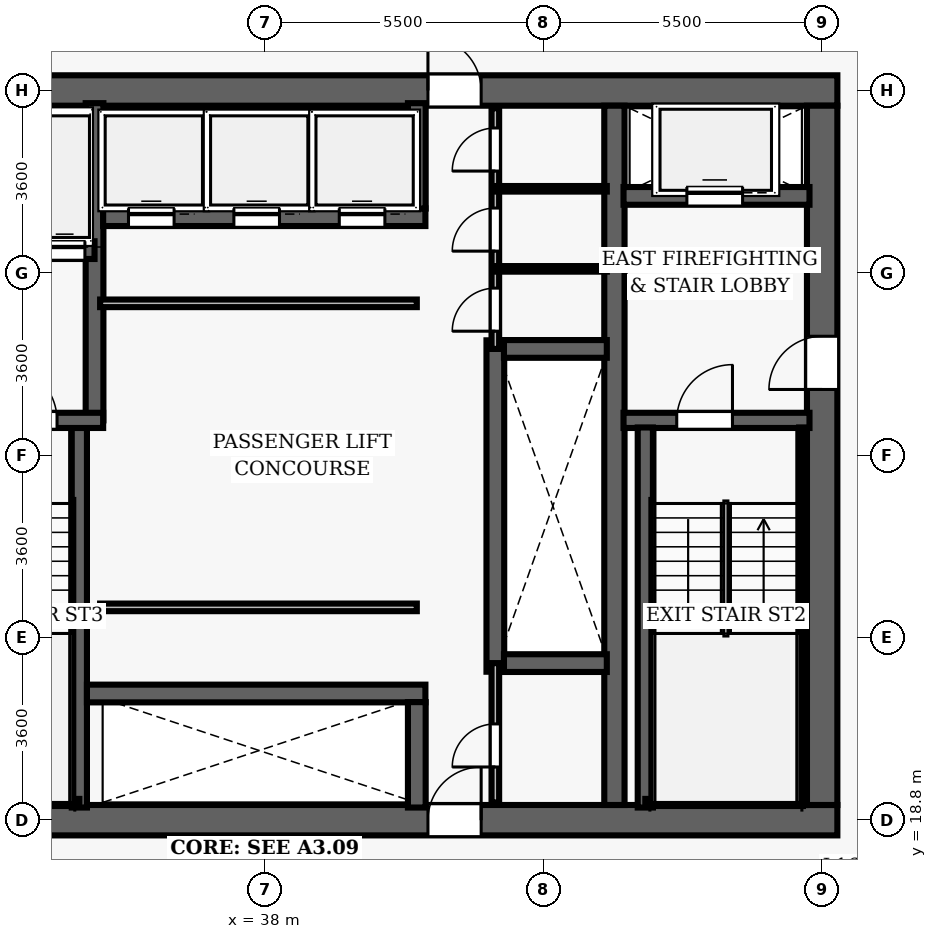
"""IFC4 building model, lengths in metres.
Left out: names, types, materials, properties, quantities, classifications, styles, units other than length and angle.
Written with IfcOpenShell. Run it as: python <this file> out.ifc"""

import sys

from ifc_helpers import new_model, si_unit, direction, frame, frame_2d, origin, place, context, subcontext, project, spatial, rectangle, extrude, element, fill, save


model = new_model("IFC4")
c1 = context("Model", 3, precision=1e-05, world=origin(), true_north=direction((0.0, 1.0)))
c2 = subcontext(c1, "Body", "Model", "MODEL_VIEW")
j1 = project(units=[si_unit("LENGTHUNIT", "METRE"), si_unit("PLANEANGLEUNIT", "RADIAN")], contexts=[c1])
p1 = place(None, origin())
s1 = spatial("IfcSite", under=j1, at=p1, CompositionType="ELEMENT")
p2 = place(p1, origin())
s2 = spatial("IfcBuilding", under=s1, at=p2, CompositionType="ELEMENT")
p3 = place(p2, frame((0.0, 0.0, 72.9)))
s3 = spatial("IfcBuildingStorey", under=s2, at=p3, CompositionType="ELEMENT", Elevation=72.9)
p4 = place(p3, frame((26.7, 18.8, 0.0), z_axis=(0.0, 0.0, 1.0), x_axis=(1.0, 0.0, 0.0)))
e1 = element("IfcWall", 1, at=p4, inside=s3, PredefinedType="SHEAR", context=c2, shape_type="SweptSolid", body=[
    extrude(rectangle(XDim=22.6, YDim=0.6, at=frame_2d((11.3, 0.0))), origin(), (0.0, 0.0, 1.0), 3.5),
])
p5 = place(p4, frame((14.52, 0.0, 0.0)))
e2 = element("IfcOpeningElement", 2, at=p5, cuts=e1, PredefinedType="OPENING", context=c2, shape_type="SweptSolid", body=[
    extrude(rectangle(XDim=1.05, YDim=2.15, at=frame_2d((0.525, 1.075))), frame((0.0, 0.31, 0.0), z_axis=(0.0, -1.0, 0.0), x_axis=(1.0, 0.0, 0.0)), (0.0, 0.0, 1.0), 0.62),
])
p6 = place(p3, frame((26.7, 33.2, 0.0), z_axis=(0.0, 0.0, 1.0), x_axis=(1.0, 0.0, 0.0)))
e3 = element("IfcWall", 3, at=p6, inside=s3, PredefinedType="SHEAR", context=c2, shape_type="SweptSolid", body=[
    extrude(rectangle(XDim=22.6, YDim=0.6, at=frame_2d((11.3, 0.0))), origin(), (0.0, 0.0, 1.0), 3.5),
])
p7 = place(p6, frame((4.62, 0.0, 0.0)))
e4 = element("IfcOpeningElement", 4, at=p7, cuts=e3, PredefinedType="OPENING", context=c2, shape_type="SweptSolid", body=[
    extrude(rectangle(XDim=1.05, YDim=2.15, at=frame_2d((0.525, 1.075))), frame((0.0, 0.31, 0.0), z_axis=(0.0, -1.0, 0.0), x_axis=(1.0, 0.0, 0.0)), (0.0, 0.0, 1.0), 0.62),
])
p8 = place(p6, frame((14.52, 0.0, 0.0)))
e5 = element("IfcOpeningElement", 5, at=p8, cuts=e3, PredefinedType="OPENING", context=c2, shape_type="SweptSolid", body=[
    extrude(rectangle(XDim=1.05, YDim=2.15, at=frame_2d((0.525, 1.075))), frame((0.0, 0.31, 0.0), z_axis=(0.0, -1.0, 0.0), x_axis=(1.0, 0.0, 0.0)), (0.0, 0.0, 1.0), 0.62),
])
p9 = place(p3, frame((49.0, 19.1, 0.0), z_axis=(0.0, 0.0, 1.0), x_axis=(0.0, 1.0, 0.0)))
e6 = element("IfcWall", 6, at=p9, inside=s3, PredefinedType="SHEAR", context=c2, shape_type="SweptSolid", body=[
    extrude(rectangle(XDim=13.8, YDim=0.6, at=frame_2d((6.9, 0.0))), origin(), (0.0, 0.0, 1.0), 3.5),
])
p10 = place(p9, frame((8.2, 0.0, 0.0)))
e7 = element("IfcOpeningElement", 7, at=p10, cuts=e6, PredefinedType="OPENING", context=c2, shape_type="SweptSolid", body=[
    extrude(rectangle(XDim=1.05, YDim=2.15, at=frame_2d((0.525, 1.075))), frame((0.0, 0.31, 0.0), z_axis=(0.0, -1.0, 0.0), x_axis=(1.0, 0.0, 0.0)), (0.0, 0.0, 1.0), 0.62),
])
p11 = place(p3, frame((44.9, 19.1, 0.0), z_axis=(0.0, 0.0, 1.0), x_axis=(0.0, 1.0, 0.0)))
e8 = element("IfcWall", 8, at=p11, inside=s3, PredefinedType="SHEAR", context=c2, shape_type="SweptSolid", body=[
    extrude(rectangle(XDim=13.8, YDim=0.4, at=frame_2d((6.9, 0.0))), origin(), (0.0, 0.0, 1.0), 3.5),
])
p12 = place(p3, frame((45.08, 26.69, 0.0), z_axis=(0.0, 0.0, 1.0), x_axis=(1.0, 0.0, 0.0)))
e9 = element("IfcWall", 9, at=p12, inside=s3, PredefinedType="SHEAR", context=c2, shape_type="SweptSolid", body=[
    extrude(rectangle(XDim=3.67, YDim=0.3, at=frame_2d((1.835, 0.0))), origin(), (0.0, 0.0, 1.0), 3.5),
])
p13 = place(p12, frame((1.05, 0.0, 0.0)))
e10 = element("IfcOpeningElement", 10, at=p13, cuts=e9, PredefinedType="OPENING", context=c2, shape_type="SweptSolid", body=[
    extrude(rectangle(XDim=1.1, YDim=2.15, at=frame_2d((0.55, 1.075))), frame((0.0, 0.16, 0.0), z_axis=(0.0, -1.0, 0.0), x_axis=(1.0, 0.0, 0.0)), (0.0, 0.0, 1.0), 0.32),
])
p14 = place(p3, frame((45.51, 19.05, 0.0), z_axis=(0.0, 0.0, 1.0), x_axis=(0.0, 1.0, 0.0)))
e11 = element("IfcWall", 11, at=p14, inside=s3, PredefinedType="SHEAR", context=c2, shape_type="SweptSolid", body=[
    extrude(rectangle(XDim=7.5, YDim=0.3, at=frame_2d((3.75, 0.0))), origin(), (0.0, 0.0, 1.0), 3.5),
])
p15 = place(p3, frame((48.605, 19.1, 0.0), z_axis=(0.0, 0.0, 1.0), x_axis=(0.0, 1.0, 0.0)))
e12 = element("IfcWall", 12, at=p15, inside=s3, PredefinedType="SHEAR", context=c2, shape_type="SweptSolid", body=[
    extrude(rectangle(XDim=7.45, YDim=0.12, at=frame_2d((3.725, 0.0))), origin(), (0.0, 0.0, 1.0), 3.5),
])
p16 = place(p3, frame((45.51, 19.16, 0.0), z_axis=(0.0, 0.0, 1.0), x_axis=(1.0, 0.0, 0.0)))
e13 = element("IfcWall", 13, at=p16, inside=s3, PredefinedType="SHEAR", context=c2, shape_type="SweptSolid", body=[
    extrude(rectangle(XDim=3.095, YDim=0.12, at=frame_2d((1.547, 0.0))), origin(), (0.0, 0.0, 1.0), 3.5),
])
p17 = place(p3, frame((45.08, 31.12, 0.0), z_axis=(0.0, 0.0, 1.0), x_axis=(1.0, 0.0, 0.0)))
e14 = element("IfcWall", 14, at=p17, inside=s3, PredefinedType="SHEAR", context=c2, shape_type="SweptSolid", body=[
    extrude(rectangle(XDim=3.67, YDim=0.35, at=frame_2d((1.835, 0.0))), origin(), (0.0, 0.0, 1.0), 2.6),
])
p18 = place(p17, frame((1.25, 0.0, 0.0)))
e15 = element("IfcOpeningElement", 15, at=p18, cuts=e14, PredefinedType="OPENING", context=c2, shape_type="SweptSolid", body=[
    extrude(rectangle(XDim=1.1, YDim=2.15, at=frame_2d((0.55, 1.075))), frame((0.0, 0.185, 0.0), z_axis=(0.0, -1.0, 0.0), x_axis=(1.0, 0.0, 0.0)), (0.0, 0.0, 1.0), 0.37),
])
p19 = place(p3, frame((34.34, 19.05, 0.0), z_axis=(0.0, 0.0, 1.0), x_axis=(0.0, 1.0, 0.0)))
e16 = element("IfcWall", 16, at=p19, inside=s3, PredefinedType="SHEAR", context=c2, shape_type="SweptSolid", body=[
    extrude(rectangle(XDim=7.5, YDim=0.3, at=frame_2d((3.75, 0.0))), origin(), (0.0, 0.0, 1.0), 3.5),
])
p20 = place(p3, frame((34.64, 26.69, 0.0), z_axis=(0.0, 0.0, 1.0), x_axis=(0.0, 1.0, 0.0)))
e17 = element("IfcWall", 17, at=p20, inside=s3, PredefinedType="SHEAR", context=c2, shape_type="SweptSolid", body=[
    extrude(rectangle(XDim=6.26, YDim=0.35, at=frame_2d((3.13, 0.0))), origin(), (0.0, 0.0, 1.0), 3.5),
])
p21 = place(p3, frame((31.25, 26.69, 0.0), z_axis=(0.0, 0.0, 1.0), x_axis=(1.0, 0.0, 0.0)))
e18 = element("IfcWall", 18, at=p21, inside=s3, PredefinedType="SHEAR", context=c2, shape_type="SweptSolid", body=[
    extrude(rectangle(XDim=3.56, YDim=0.3, at=frame_2d((1.78, 0.0))), origin(), (0.0, 0.0, 1.0), 3.5),
])
p22 = place(p21, frame((1.55, 0.0, 0.0)))
e19 = element("IfcOpeningElement", 19, at=p22, cuts=e18, PredefinedType="OPENING", context=c2, shape_type="SweptSolid", body=[
    extrude(rectangle(XDim=1.1, YDim=2.15, at=frame_2d((0.55, 1.075))), frame((0.0, 0.16, 0.0), z_axis=(0.0, -1.0, 0.0), x_axis=(1.0, 0.0, 0.0)), (0.0, 0.0, 1.0), 0.32),
])
p23 = place(p3, frame((31.3, 19.16, 0.0), z_axis=(0.0, 0.0, 1.0), x_axis=(1.0, 0.0, 0.0)))
e20 = element("IfcWall", 20, at=p23, inside=s3, PredefinedType="SHEAR", context=c2, shape_type="SweptSolid", body=[
    extrude(rectangle(XDim=3.04, YDim=0.12, at=frame_2d((1.52, 0.0))), origin(), (0.0, 0.0, 1.0), 3.5),
])
p24 = place(p3, frame((32.23, 30.05, 0.0), z_axis=(0.0, 0.0, 1.0), x_axis=(1.0, 0.0, 0.0)))
e21 = element("IfcWall", 21, at=p24, inside=s3, PredefinedType="SHEAR", context=c2, shape_type="SweptSolid", body=[
    extrude(rectangle(XDim=2.41, YDim=0.35, at=frame_2d((1.205, 0.0))), origin(), (0.0, 0.0, 1.0), 2.6),
])
p25 = place(p24, frame((0.42, 0.0, 0.0)))
e22 = element("IfcOpeningElement", 22, at=p25, cuts=e21, PredefinedType="OPENING", context=c2, shape_type="SweptSolid", body=[
    extrude(rectangle(XDim=0.8, YDim=2.15, at=frame_2d((0.4, 1.075))), frame((0.0, 0.185, 0.0), z_axis=(0.0, -1.0, 0.0), x_axis=(1.0, 0.0, 0.0)), (0.0, 0.0, 1.0), 0.37),
])
p26 = place(p24, frame((1.42, 0.0, 0.0)))
e23 = element("IfcOpeningElement", 23, at=p26, cuts=e21, PredefinedType="OPENING", context=c2, shape_type="SweptSolid", body=[
    extrude(rectangle(XDim=0.8, YDim=2.15, at=frame_2d((0.4, 1.075))), frame((0.0, 0.185, 0.0), z_axis=(0.0, -1.0, 0.0), x_axis=(1.0, 0.0, 0.0)), (0.0, 0.0, 1.0), 0.37),
])
p27 = place(p3, frame((42.55, 21.73, 0.0), z_axis=(0.0, 0.0, 1.0), x_axis=(0.0, 1.0, 0.0)))
e24 = element("IfcWall", 24, at=p27, inside=s3, PredefinedType="SHEAR", context=c2, shape_type="SweptSolid", body=[
    extrude(rectangle(XDim=6.54, YDim=0.35, at=frame_2d((3.27, 0.0))), origin(), (0.0, 0.0, 1.0), 2.6),
])
for number, where, z_axis, x_axis in (
    (25, (42.72, 21.9, 0.0), (0.0, 0.0, 1.0), (1.0, 0.0, 0.0)),
    (26, (42.72, 28.1, 0.0), (0.0, 0.0, 1.0), (1.0, 0.0, 0.0)),
):
    element("IfcWall", number, at=place(p3, frame(where, z_axis=z_axis, x_axis=x_axis)), inside=s3, PredefinedType="SHEAR", context=c2, shape_type="SweptSolid", body=[
        extrude(rectangle(XDim=2.03, YDim=0.35, at=frame_2d((1.015, 0.0))), origin(), (0.0, 0.0, 1.0), 2.6),
    ])
p28 = place(p3, frame((34.81, 30.7, 0.0), z_axis=(0.0, 0.0, 1.0), x_axis=(1.0, 0.0, 0.0)))
e27 = element("IfcWall", 27, at=p28, inside=s3, PredefinedType="SHEAR", context=c2, shape_type="SweptSolid", body=[
    extrude(rectangle(XDim=6.36, YDim=0.35, at=frame_2d((3.18, 0.0))), origin(), (0.0, 0.0, 1.0), 2.6),
])
p29 = place(p28, frame((0.5, 0.0, 0.0)))
e28 = element("IfcOpeningElement", 28, at=p29, cuts=e27, PredefinedType="OPENING", context=c2, shape_type="SweptSolid", body=[
    extrude(rectangle(XDim=0.9, YDim=2.15, at=frame_2d((0.45, 1.075))), frame((0.0, 0.185, 0.0), z_axis=(0.0, -1.0, 0.0), x_axis=(1.0, 0.0, 0.0)), (0.0, 0.0, 1.0), 0.37),
])
p30 = place(p28, frame((2.58, 0.0, 0.0)))
e29 = element("IfcOpeningElement", 29, at=p30, cuts=e27, PredefinedType="OPENING", context=c2, shape_type="SweptSolid", body=[
    extrude(rectangle(XDim=0.9, YDim=2.15, at=frame_2d((0.45, 1.075))), frame((0.0, 0.185, 0.0), z_axis=(0.0, -1.0, 0.0), x_axis=(1.0, 0.0, 0.0)), (0.0, 0.0, 1.0), 0.37),
])
p31 = place(p28, frame((4.66, 0.0, 0.0)))
e30 = element("IfcOpeningElement", 30, at=p31, cuts=e27, PredefinedType="OPENING", context=c2, shape_type="SweptSolid", body=[
    extrude(rectangle(XDim=0.9, YDim=2.15, at=frame_2d((0.45, 1.075))), frame((0.0, 0.185, 0.0), z_axis=(0.0, -1.0, 0.0), x_axis=(1.0, 0.0, 0.0)), (0.0, 0.0, 1.0), 0.37),
])
p32 = place(p3, frame((41.0, 30.87, 0.0), z_axis=(0.0, 0.0, 1.0), x_axis=(0.0, 1.0, 0.0)))
e31 = element("IfcWall", 31, at=p32, inside=s3, PredefinedType="SHEAR", context=c2, shape_type="SweptSolid", body=[
    extrude(rectangle(XDim=2.08, YDim=0.35, at=frame_2d((1.04, 0.0))), origin(), (0.0, 0.0, 1.0), 2.6),
])
p33 = place(p3, frame((34.49, 21.3, 0.0), z_axis=(0.0, 0.0, 1.0), x_axis=(1.0, 0.0, 0.0)))
e32 = element("IfcWall", 32, at=p33, inside=s3, PredefinedType="SHEAR", context=c2, shape_type="SweptSolid", body=[
    extrude(rectangle(XDim=6.68, YDim=0.35, at=frame_2d((3.34, 0.0))), origin(), (0.0, 0.0, 1.0), 2.6),
])
p34 = place(p3, frame((41.0, 19.05, 0.0), z_axis=(0.0, 0.0, 1.0), x_axis=(0.0, 1.0, 0.0)))
e33 = element("IfcWall", 33, at=p34, inside=s3, PredefinedType="SHEAR", context=c2, shape_type="SweptSolid", body=[
    extrude(rectangle(XDim=2.08, YDim=0.35, at=frame_2d((1.04, 0.0))), origin(), (0.0, 0.0, 1.0), 2.6),
])
for number, where, z_axis, x_axis in (
    (34, (34.75, 29.0, 0.0), (0.0, 0.0, 1.0), (1.0, 0.0, 0.0)),
    (35, (34.75, 23.0, 0.0), (0.0, 0.0, 1.0), (1.0, 0.0, 0.0)),
):
    element("IfcWall", number, at=place(p3, frame(where, z_axis=z_axis, x_axis=x_axis)), inside=s3, PredefinedType="PARTITIONING", context=c2, shape_type="SweptSolid", body=[
        extrude(rectangle(XDim=6.25, YDim=0.15, at=frame_2d((3.125, 0.0))), origin(), (0.0, 0.0, 1.0), 2.6),
    ])
p35 = place(p3, frame((42.55, 28.1, 0.0), z_axis=(0.0, 0.0, 1.0), x_axis=(0.0, 1.0, 0.0)))
e36 = element("IfcWall", 36, at=p35, inside=s3, PredefinedType="PARTITIONING", context=c2, shape_type="SweptSolid", body=[
    extrude(rectangle(XDim=4.75, YDim=0.15, at=frame_2d((2.375, 0.0))), origin(), (0.0, 0.0, 1.0), 2.6),
])
p36 = place(p35, frame((0.35, 0.0, 0.0)))
e37 = element("IfcOpeningElement", 37, at=p36, cuts=e36, PredefinedType="OPENING", context=c2, shape_type="SweptSolid", body=[
    extrude(rectangle(XDim=0.85, YDim=2.1, at=frame_2d((0.425, 1.05))), frame((0.0, 0.085, 0.0), z_axis=(0.0, -1.0, 0.0), x_axis=(1.0, 0.0, 0.0)), (0.0, 0.0, 1.0), 0.17),
])
p37 = place(p35, frame((1.93, 0.0, 0.0)))
e38 = element("IfcOpeningElement", 38, at=p37, cuts=e36, PredefinedType="OPENING", context=c2, shape_type="SweptSolid", body=[
    extrude(rectangle(XDim=0.85, YDim=2.1, at=frame_2d((0.425, 1.05))), frame((0.0, 0.085, 0.0), z_axis=(0.0, -1.0, 0.0), x_axis=(1.0, 0.0, 0.0)), (0.0, 0.0, 1.0), 0.17),
])
p38 = place(p35, frame((3.51, 0.0, 0.0)))
e39 = element("IfcOpeningElement", 39, at=p38, cuts=e36, PredefinedType="OPENING", context=c2, shape_type="SweptSolid", body=[
    extrude(rectangle(XDim=0.85, YDim=2.1, at=frame_2d((0.425, 1.05))), frame((0.0, 0.085, 0.0), z_axis=(0.0, -1.0, 0.0), x_axis=(1.0, 0.0, 0.0)), (0.0, 0.0, 1.0), 0.17),
])
for number, where, z_axis, x_axis in (
    (40, (42.55, 29.68, 0.0), (0.0, 0.0, 1.0), (1.0, 0.0, 0.0)),
    (41, (42.55, 31.26, 0.0), (0.0, 0.0, 1.0), (1.0, 0.0, 0.0)),
):
    element("IfcWall", number, at=place(p3, frame(where, z_axis=z_axis, x_axis=x_axis)), inside=s3, PredefinedType="PARTITIONING", context=c2, shape_type="SweptSolid", body=[
        extrude(rectangle(XDim=2.2, YDim=0.11, at=frame_2d((1.1, 0.0))), origin(), (0.0, 0.0, 1.0), 2.6),
    ])
p39 = place(p3, frame((42.55, 19.15, 0.0), z_axis=(0.0, 0.0, 1.0), x_axis=(0.0, 1.0, 0.0)))
e42 = element("IfcWall", 42, at=p39, inside=s3, PredefinedType="PARTITIONING", context=c2, shape_type="SweptSolid", body=[
    extrude(rectangle(XDim=2.75, YDim=0.15, at=frame_2d((1.375, 0.0))), origin(), (0.0, 0.0, 1.0), 2.6),
])
p40 = place(p39, frame((0.7, 0.0, 0.0)))
e43 = element("IfcOpeningElement", 43, at=p40, cuts=e42, PredefinedType="OPENING", context=c2, shape_type="SweptSolid", body=[
    extrude(rectangle(XDim=0.85, YDim=2.1, at=frame_2d((0.425, 1.05))), frame((0.0, 0.085, 0.0), z_axis=(0.0, -1.0, 0.0), x_axis=(1.0, 0.0, 0.0)), (0.0, 0.0, 1.0), 0.17),
])
p41 = place(p13, origin())
e44 = element("IfcDoor", 44, at=p41, inside=s3, OperationType="SINGLE_SWING_RIGHT", PredefinedType="DOOR", context=c2, shape_type="SweptSolid", body=[
    extrude(rectangle(XDim=1.1, YDim=2.15, at=frame_2d((0.55, 1.075))), frame((0.0, 0.025, 0.0), z_axis=(0.0, -1.0, 0.0), x_axis=(1.0, 0.0, 0.0)), (0.0, 0.0, 1.0), 0.05),
])
fill(e10, e44)
p42 = place(p10, origin())
e45 = element("IfcDoor", 45, at=p42, inside=s3, OperationType="SINGLE_SWING_LEFT", PredefinedType="DOOR", context=c2, shape_type="SweptSolid", body=[
    extrude(rectangle(XDim=1.05, YDim=2.15, at=frame_2d((0.525, 1.075))), frame((0.0, 0.025, 0.0), z_axis=(0.0, -1.0, 0.0), x_axis=(1.0, 0.0, 0.0)), (0.0, 0.0, 1.0), 0.05),
])
fill(e7, e45)
p43 = place(p22, origin())
e46 = element("IfcDoor", 46, at=p43, inside=s3, OperationType="SINGLE_SWING_LEFT", PredefinedType="DOOR", context=c2, shape_type="SweptSolid", body=[
    extrude(rectangle(XDim=1.1, YDim=2.15, at=frame_2d((0.55, 1.075))), frame((0.0, 0.025, 0.0), z_axis=(0.0, -1.0, 0.0), x_axis=(1.0, 0.0, 0.0)), (0.0, 0.0, 1.0), 0.05),
])
fill(e19, e46)
p44 = place(p8, origin())
e47 = element("IfcDoor", 47, at=p44, inside=s3, OperationType="SINGLE_SWING_LEFT", PredefinedType="DOOR", context=c2, shape_type="SweptSolid", body=[
    extrude(rectangle(XDim=1.05, YDim=2.15, at=frame_2d((0.525, 1.075))), frame((0.0, 0.025, 0.0), z_axis=(0.0, -1.0, 0.0), x_axis=(1.0, 0.0, 0.0)), (0.0, 0.0, 1.0), 0.05),
])
fill(e5, e47)
p45 = place(p5, origin())
e48 = element("IfcDoor", 48, at=p45, inside=s3, OperationType="SINGLE_SWING_RIGHT", PredefinedType="DOOR", context=c2, shape_type="SweptSolid", body=[
    extrude(rectangle(XDim=1.05, YDim=2.15, at=frame_2d((0.525, 1.075))), frame((0.0, 0.025, 0.0), z_axis=(0.0, -1.0, 0.0), x_axis=(1.0, 0.0, 0.0)), (0.0, 0.0, 1.0), 0.05),
])
fill(e2, e48)
p46 = place(p36, origin())
e49 = element("IfcDoor", 49, at=p46, inside=s3, OperationType="SINGLE_SWING_LEFT", PredefinedType="DOOR", context=c2, shape_type="SweptSolid", body=[
    extrude(rectangle(XDim=0.85, YDim=2.1, at=frame_2d((0.425, 1.05))), frame((0.0, 0.025, 0.0), z_axis=(0.0, -1.0, 0.0), x_axis=(1.0, 0.0, 0.0)), (0.0, 0.0, 1.0), 0.05),
])
fill(e37, e49)
p47 = place(p37, origin())
e50 = element("IfcDoor", 50, at=p47, inside=s3, OperationType="SINGLE_SWING_LEFT", PredefinedType="DOOR", context=c2, shape_type="SweptSolid", body=[
    extrude(rectangle(XDim=0.85, YDim=2.1, at=frame_2d((0.425, 1.05))), frame((0.0, 0.025, 0.0), z_axis=(0.0, -1.0, 0.0), x_axis=(1.0, 0.0, 0.0)), (0.0, 0.0, 1.0), 0.05),
])
fill(e38, e50)
p48 = place(p38, origin())
e51 = element("IfcDoor", 51, at=p48, inside=s3, OperationType="SINGLE_SWING_LEFT", PredefinedType="DOOR", context=c2, shape_type="SweptSolid", body=[
    extrude(rectangle(XDim=0.85, YDim=2.1, at=frame_2d((0.425, 1.05))), frame((0.0, 0.025, 0.0), z_axis=(0.0, -1.0, 0.0), x_axis=(1.0, 0.0, 0.0)), (0.0, 0.0, 1.0), 0.05),
])
fill(e39, e51)
p49 = place(p40, origin())
e52 = element("IfcDoor", 52, at=p49, inside=s3, OperationType="SINGLE_SWING_LEFT", PredefinedType="DOOR", context=c2, shape_type="SweptSolid", body=[
    extrude(rectangle(XDim=0.85, YDim=2.1, at=frame_2d((0.425, 1.05))), frame((0.0, 0.025, 0.0), z_axis=(0.0, -1.0, 0.0), x_axis=(1.0, 0.0, 0.0)), (0.0, 0.0, 1.0), 0.05),
])
fill(e43, e52)
p50 = place(p29, origin())
e53 = element("IfcDoor", 53, at=p50, inside=s3, OperationType="SLIDING_TO_LEFT", PredefinedType="DOOR", context=c2, shape_type="SweptSolid", body=[
    extrude(rectangle(XDim=0.9, YDim=2.15, at=frame_2d((0.45, 1.075))), frame((0.0, 0.025, 0.0), z_axis=(0.0, -1.0, 0.0), x_axis=(1.0, 0.0, 0.0)), (0.0, 0.0, 1.0), 0.05),
])
fill(e28, e53)
p51 = place(p30, origin())
e54 = element("IfcDoor", 54, at=p51, inside=s3, OperationType="SLIDING_TO_LEFT", PredefinedType="DOOR", context=c2, shape_type="SweptSolid", body=[
    extrude(rectangle(XDim=0.9, YDim=2.15, at=frame_2d((0.45, 1.075))), frame((0.0, 0.025, 0.0), z_axis=(0.0, -1.0, 0.0), x_axis=(1.0, 0.0, 0.0)), (0.0, 0.0, 1.0), 0.05),
])
fill(e29, e54)
p52 = place(p31, origin())
e55 = element("IfcDoor", 55, at=p52, inside=s3, OperationType="SLIDING_TO_LEFT", PredefinedType="DOOR", context=c2, shape_type="SweptSolid", body=[
    extrude(rectangle(XDim=0.9, YDim=2.15, at=frame_2d((0.45, 1.075))), frame((0.0, 0.025, 0.0), z_axis=(0.0, -1.0, 0.0), x_axis=(1.0, 0.0, 0.0)), (0.0, 0.0, 1.0), 0.05),
])
fill(e30, e55)
p53 = place(p18, origin())
e56 = element("IfcDoor", 56, at=p53, inside=s3, OperationType="SLIDING_TO_LEFT", PredefinedType="DOOR", context=c2, shape_type="SweptSolid", body=[
    extrude(rectangle(XDim=1.1, YDim=2.15, at=frame_2d((0.55, 1.075))), frame((0.0, 0.025, 0.0), z_axis=(0.0, -1.0, 0.0), x_axis=(1.0, 0.0, 0.0)), (0.0, 0.0, 1.0), 0.05),
])
fill(e15, e56)
p54 = place(p26, origin())
e57 = element("IfcDoor", 57, at=p54, inside=s3, OperationType="SLIDING_TO_LEFT", PredefinedType="DOOR", context=c2, shape_type="SweptSolid", body=[
    extrude(rectangle(XDim=0.8, YDim=2.15, at=frame_2d((0.4, 1.075))), frame((0.0, 0.025, 0.0), z_axis=(0.0, -1.0, 0.0), x_axis=(1.0, 0.0, 0.0)), (0.0, 0.0, 1.0), 0.05),
])
fill(e23, e57)
save(model, sys.argv[1])
